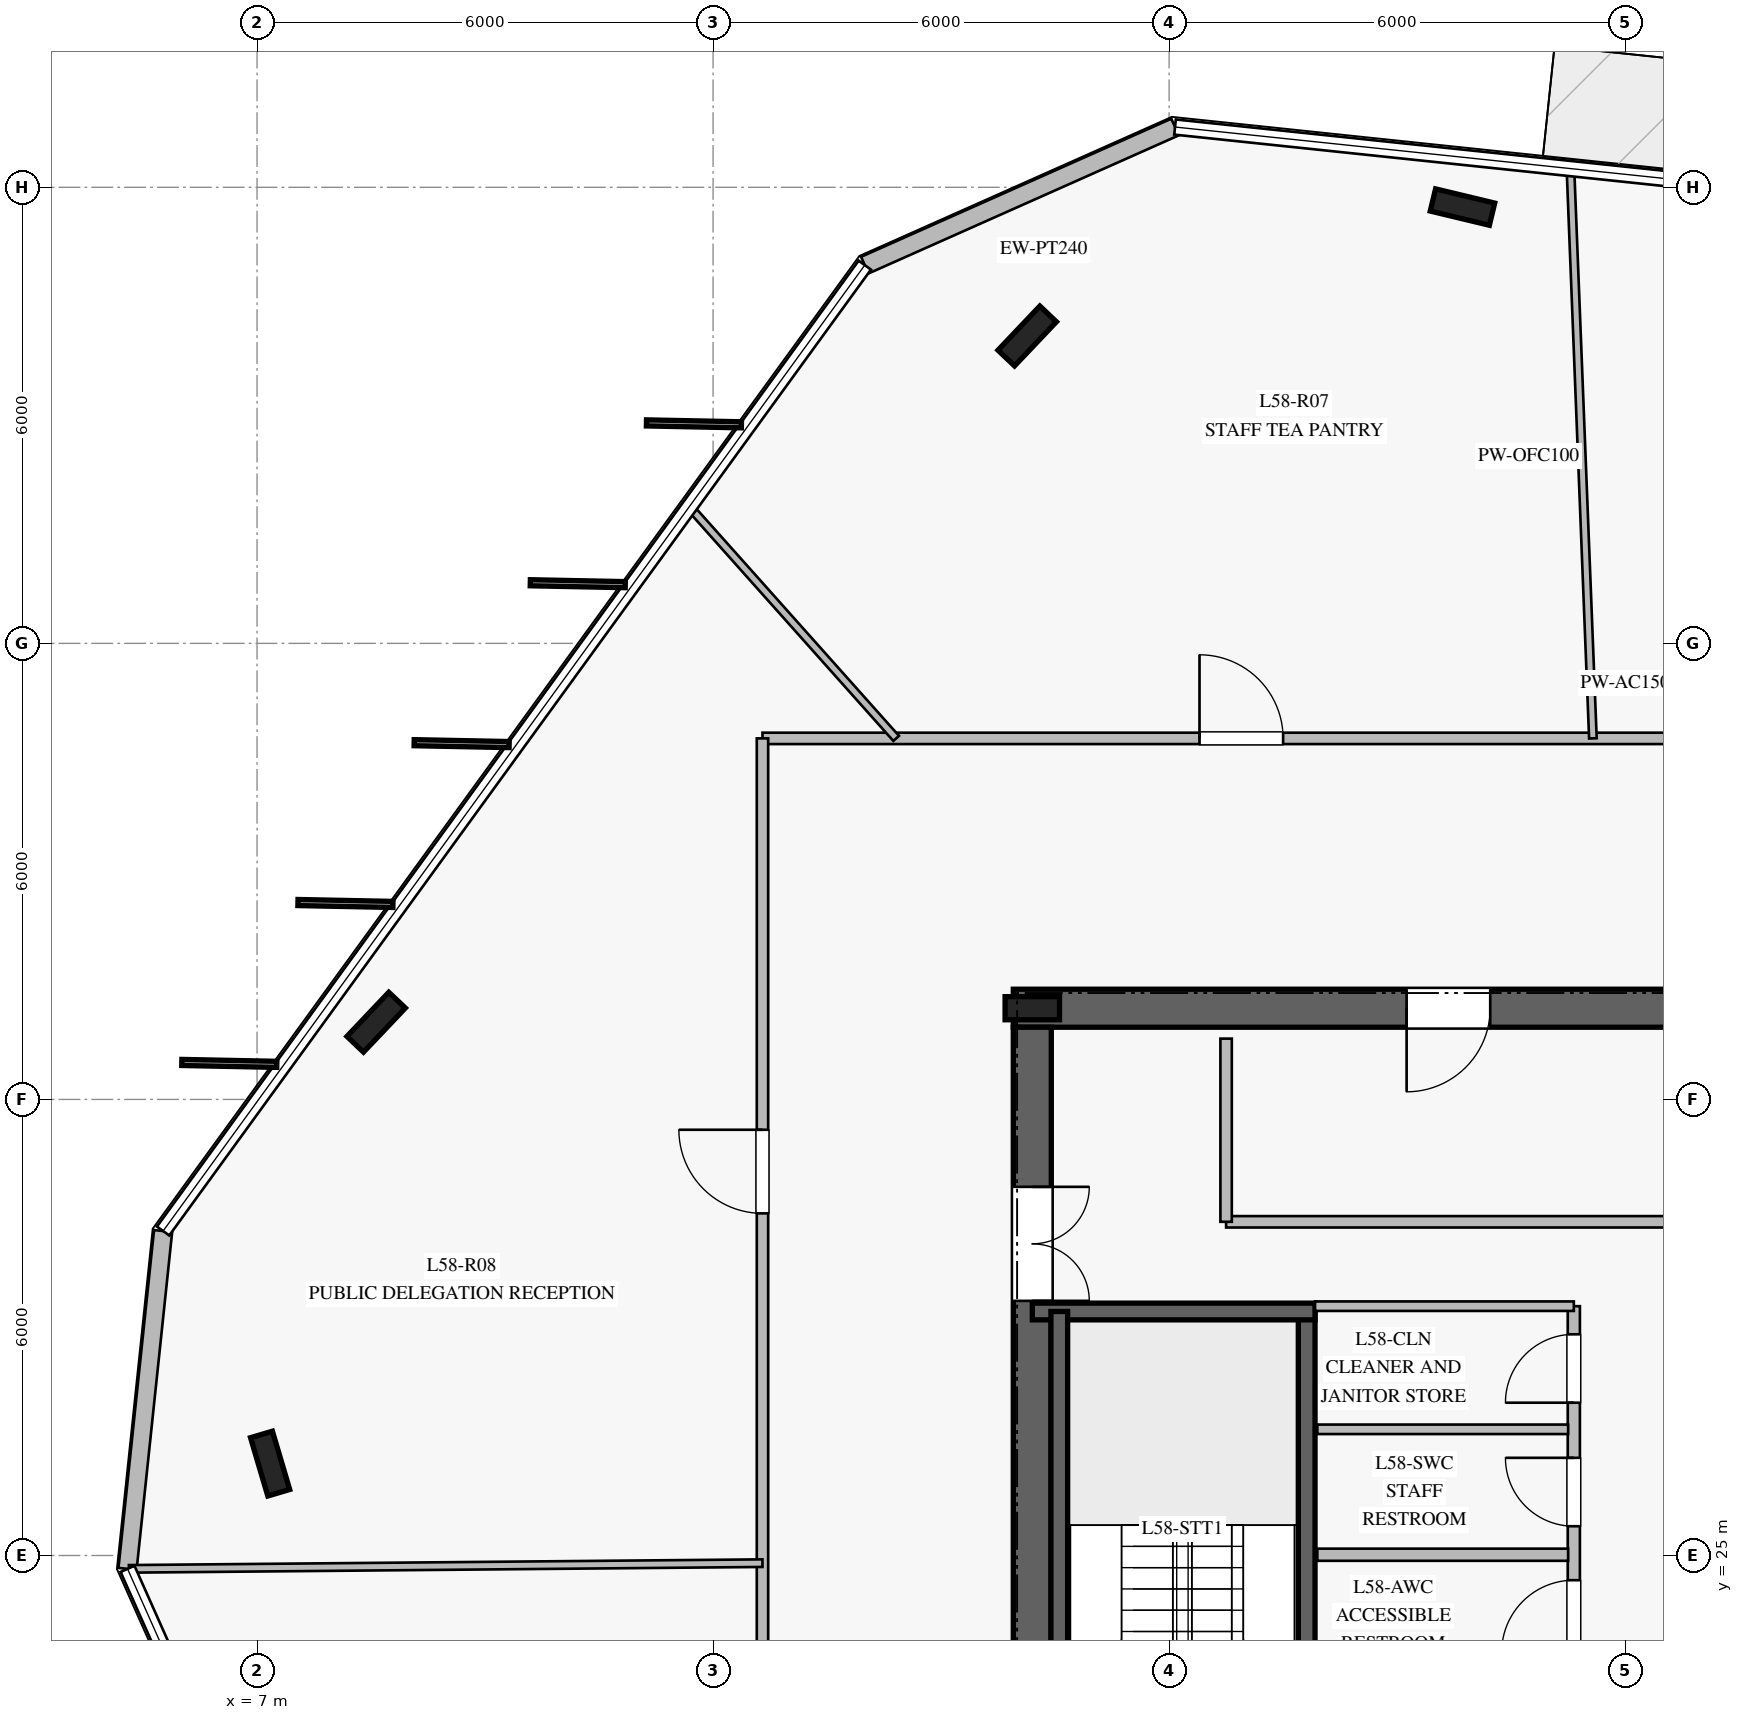
"""IFC4 building model, lengths in metres.
Left out: names, types, materials, properties, quantities, classifications, styles, units other than length and angle.
Written with IfcOpenShell. Run it as: python <this file> out.ifc"""

import sys

from ifc_helpers import new_model, si_unit, direction, frame, frame_2d, origin, origin_2d, place, context, subcontext, project, spatial, rectangle, i_section, extrude, element, fill, save


model = new_model("IFC4")
c1 = context("Model", 3, precision=1e-05, world=origin(), true_north=direction((0.0, 1.0)))
c2 = subcontext(c1, "Body", "Model", "MODEL_VIEW")
j1 = project(units=[si_unit("LENGTHUNIT", "METRE"), si_unit("PLANEANGLEUNIT", "RADIAN")], contexts=[c1])
p1 = place(None, origin())
s1 = spatial("IfcSite", under=j1, at=p1, CompositionType="ELEMENT")
p2 = place(p1, origin())
s2 = spatial("IfcBuilding", under=s1, at=p2, CompositionType="ELEMENT")
p3 = place(p2, frame((0.0, 0.0, 240.8)))
s3 = spatial("IfcBuildingStorey", under=s2, at=p3, CompositionType="ELEMENT", Elevation=240.8)
p4 = place(p3, frame((33.05, 32.2, 0.0), z_axis=(0.0, 0.0, 1.0), x_axis=(-1.0, 0.0, 0.0)))
e1 = element("IfcWall", 1, at=p4, inside=s3, PredefinedType="SHEAR", context=c2, shape_type="SweptSolid", body=[
    extrude(rectangle(XDim=16.1, YDim=0.5, at=frame_2d((8.05, 0.0))), origin(), (0.0, 0.0, 1.0), 3.7),
])
p5 = place(p4, frame((5.0, 0.0, 0.0)))
e2 = element("IfcOpeningElement", 2, at=p5, cuts=e1, PredefinedType="OPENING", context=c2, shape_type="SweptSolid", body=[
    extrude(rectangle(XDim=1.2, YDim=2.25, at=frame_2d((0.6, 1.125))), frame((0.0, 0.26, 0.0), z_axis=(0.0, -1.0, 0.0), x_axis=(1.0, 0.0, 0.0)), (0.0, 0.0, 1.0), 0.52),
])
p6 = place(p4, frame((9.825, 0.0, 0.0)))
e3 = element("IfcOpeningElement", 3, at=p6, cuts=e1, PredefinedType="OPENING", context=c2, shape_type="SweptSolid", body=[
    extrude(rectangle(XDim=1.1, YDim=2.2, at=frame_2d((0.55, 1.1))), frame((0.0, 0.26, 0.0), z_axis=(0.0, -1.0, 0.0), x_axis=(1.0, 0.0, 0.0)), (0.0, 0.0, 1.0), 0.52),
])
p7 = place(p3, frame((17.2, 31.95, 0.0), z_axis=(0.0, 0.0, 1.0), x_axis=(0.0, -1.0, 0.0)))
e4 = element("IfcWall", 4, at=p7, inside=s3, PredefinedType="SHEAR", context=c2, shape_type="SweptSolid", body=[
    extrude(rectangle(XDim=13.9, YDim=0.5, at=frame_2d((6.95, 0.0))), origin(), (0.0, 0.0, 1.0), 3.7),
])
p8 = place(p7, frame((2.1, 0.0, 0.0)))
e5 = element("IfcOpeningElement", 5, at=p8, cuts=e4, PredefinedType="OPENING", context=c2, shape_type="SweptSolid", body=[
    extrude(rectangle(XDim=1.5, YDim=2.2, at=frame_2d((0.75, 1.1))), frame((0.0, 0.26, 0.0), z_axis=(0.0, -1.0, 0.0), x_axis=(1.0, 0.0, 0.0)), (0.0, 0.0, 1.0), 0.52),
])
p9 = place(p3, frame((17.2, 32.2, 0.0), z_axis=(0.0, 0.0, 1.0), x_axis=(1.0, 0.0, 0.0)))
e6 = element("IfcColumn", 6, at=p9, inside=s3, PredefinedType="COLUMN", context=c2, shape_type="SweptSolid", body=[
    extrude(i_section(OverallWidth=0.304, OverallDepth=0.716, WebThickness=0.021, FlangeThickness=0.04, at=origin_2d()), origin(), (0.0, 0.0, 1.0), 4.0),
])
p10 = place(p3, frame((20.81, 20.99, 0.0), z_axis=(0.0, 0.0, 1.0), x_axis=(0.0, 1.0, 0.0)))
e7 = element("IfcWall", 7, at=p10, inside=s3, PredefinedType="SOLIDWALL", context=c2, shape_type="SweptSolid", body=[
    extrude(rectangle(XDim=7.22, YDim=0.22, at=frame_2d((3.61, 0.0))), origin(), (0.0, 0.0, 1.0), 3.7),
])
p11 = place(p10, frame((0.18, 0.0, 0.0)))
e8 = element("IfcOpeningElement", 8, at=p11, cuts=e7, PredefinedType="OPENING", context=c2, shape_type="SweptSolid", body=[
    extrude(rectangle(XDim=1.15, YDim=2.2, at=frame_2d((0.575, 1.1))), frame((0.0, 0.12, 0.0), z_axis=(0.0, -1.0, 0.0), x_axis=(1.0, 0.0, 0.0)), (0.0, 0.0, 1.0), 0.24),
])
p12 = place(p3, frame((17.2, 28.21, 0.0), z_axis=(0.0, 0.0, 1.0), x_axis=(1.0, 0.0, 0.0)))
e9 = element("IfcWall", 9, at=p12, inside=s3, PredefinedType="SOLIDWALL", context=c2, shape_type="SweptSolid", body=[
    extrude(rectangle(XDim=3.72, YDim=0.22, at=frame_2d((1.86, 0.0))), origin(), (0.0, 0.0, 1.0), 3.7),
])
p13 = place(p3, frame((17.555, 28.21, 0.0), z_axis=(0.0, 0.0, 1.0), x_axis=(0.0, -1.0, 0.0)))
e10 = element("IfcWall", 10, at=p13, inside=s3, PredefinedType="SOLIDWALL", context=c2, shape_type="SweptSolid", body=[
    extrude(rectangle(XDim=7.22, YDim=0.22, at=frame_2d((3.61, 0.0))), origin(), (0.0, 0.0, 1.0), 3.7),
])
for number, where, z_axis, x_axis in (
    (11, (22.86, 42.74, 0.0), (0.0, 0.0, 1.0), (-0.972, 0.233, 0.0)),
    (12, (17.133, 41.044, 0.0), (0.0, 0.0, 1.0), (0.688, 0.725, 0.0)),
    (13, (8.567, 32.016, 0.0), (0.0, 0.0, 1.0), (0.688, 0.725, 0.0)),
    (14, (7.172, 26.209, 0.0), (0.0, 0.0, 1.0), (-0.284, 0.959, 0.0)),
):
    element("IfcColumn", number, at=place(p3, frame(where, z_axis=z_axis, x_axis=x_axis)), inside=s3, PredefinedType="COLUMN", context=c2, shape_type="SweptSolid", body=[
        extrude(i_section(OverallWidth=0.3, OverallDepth=0.8, WebThickness=0.018, FlangeThickness=0.033, at=origin_2d()), origin(), (0.0, 0.0, 1.0), 4.0),
    ])
p14 = place(p3, frame((19.078, 43.793, 0.0), z_axis=(0.0, 0.0, 1.0), x_axis=(-0.913581562374, -0.406655540833, 0.0)))
e15 = element("IfcWall", 15, at=p14, inside=s3, PredefinedType="STANDARD", context=c2, shape_type="SweptSolid", body=[
    extrude(rectangle(XDim=4.468, YDim=0.24, at=frame_2d((2.234, 0.0))), origin(), (0.0, 0.0, 1.0), 3.7),
])
p15 = place(p3, frame((5.764, 29.269, 0.0), z_axis=(0.0, 0.0, 1.0), x_axis=(-0.104710374516, -0.994502758904, 0.0)))
e16 = element("IfcWall", 16, at=p15, inside=s3, PredefinedType="STANDARD", context=c2, shape_type="SweptSolid", body=[
    extrude(rectangle(XDim=4.47, YDim=0.24, at=frame_2d((2.235, 0.0))), origin(), (0.0, 0.0, 1.0), 3.7),
])
p16 = place(p3, frame((24.325, 23.35, 0.0), z_axis=(0.0, 0.0, 1.0), x_axis=(0.0, 1.0, 0.0)))
e17 = element("IfcWall", 17, at=p16, inside=s3, PredefinedType="PLUMBINGWALL", context=c2, shape_type="SweptSolid", body=[
    extrude(rectangle(XDim=4.93, YDim=0.16, at=frame_2d((2.465, 0.0))), origin(), (0.0, 0.0, 1.0), 3.7),
])
p17 = place(p16, frame((0.375, 0.0, 0.0)))
e18 = element("IfcOpeningElement", 18, at=p17, cuts=e17, PredefinedType="OPENING", context=c2, shape_type="SweptSolid", body=[
    extrude(rectangle(XDim=0.95, YDim=2.1, at=frame_2d((0.475, 1.05))), frame((0.0, 0.09, 0.0), z_axis=(0.0, -1.0, 0.0), x_axis=(1.0, 0.0, 0.0)), (0.0, 0.0, 1.0), 0.18),
])
p18 = place(p16, frame((2.035, 0.0, 0.0)))
e19 = element("IfcOpeningElement", 19, at=p18, cuts=e17, PredefinedType="OPENING", context=c2, shape_type="SweptSolid", body=[
    extrude(rectangle(XDim=0.9, YDim=2.1, at=frame_2d((0.45, 1.05))), frame((0.0, 0.09, 0.0), z_axis=(0.0, -1.0, 0.0), x_axis=(1.0, 0.0, 0.0)), (0.0, 0.0, 1.0), 0.18),
])
p19 = place(p16, frame((3.66, 0.0, 0.0)))
e20 = element("IfcOpeningElement", 20, at=p19, cuts=e17, PredefinedType="OPENING", context=c2, shape_type="SweptSolid", body=[
    extrude(rectangle(XDim=0.9, YDim=2.1, at=frame_2d((0.45, 1.05))), frame((0.0, 0.09, 0.0), z_axis=(0.0, -1.0, 0.0), x_axis=(1.0, 0.0, 0.0)), (0.0, 0.0, 1.0), 0.18),
])
p20 = place(p3, frame((20.92, 28.28, 0.0), z_axis=(0.0, 0.0, 1.0), x_axis=(1.0, 0.0, 0.0)))
e21 = element("IfcWall", 21, at=p20, inside=s3, PredefinedType="PARTITIONING", context=c2, shape_type="SweptSolid", body=[
    extrude(rectangle(XDim=3.405, YDim=0.125, at=frame_2d((1.703, 0.0))), origin(), (0.0, 0.0, 1.0), 3.7),
])
p21 = place(p3, frame((20.95, 25.01, 0.0), z_axis=(0.0, 0.0, 1.0), x_axis=(1.0, 0.0, 0.0)))
e22 = element("IfcWall", 22, at=p21, inside=s3, PredefinedType="PLUMBINGWALL", context=c2, shape_type="SweptSolid", body=[
    extrude(rectangle(XDim=3.3, YDim=0.16, at=frame_2d((1.65, 0.0))), origin(), (0.0, 0.0, 1.0), 3.7),
])
p22 = place(p3, frame((20.95, 26.66, 0.0), z_axis=(0.0, 0.0, 1.0), x_axis=(1.0, 0.0, 0.0)))
e23 = element("IfcWall", 23, at=p22, inside=s3, PredefinedType="PARTITIONING", context=c2, shape_type="SweptSolid", body=[
    extrude(rectangle(XDim=3.3, YDim=0.125, at=frame_2d((1.65, 0.0))), origin(), (0.0, 0.0, 1.0), 3.7),
])
p23 = place(p3, frame((19.75, 29.39, 0.0), z_axis=(0.0, 0.0, 1.0), x_axis=(1.0, 0.0, 0.0)))
e24 = element("IfcWall", 24, at=p23, inside=s3, PredefinedType="PARTITIONING", context=c2, shape_type="SweptSolid", body=[
    extrude(rectangle(XDim=5.9, YDim=0.15, at=frame_2d((2.95, 0.0))), origin(), (0.0, 0.0, 1.0), 3.7),
])
p24 = place(p3, frame((19.75, 29.39, 0.0), z_axis=(0.0, 0.0, 1.0), x_axis=(0.0, 1.0, 0.0)))
e25 = element("IfcWall", 25, at=p24, inside=s3, PredefinedType="PARTITIONING", context=c2, shape_type="SweptSolid", body=[
    extrude(rectangle(XDim=2.41, YDim=0.15, at=frame_2d((1.205, 0.0))), origin(), (0.0, 0.0, 1.0), 3.7),
])
p25 = place(p3, frame((13.65, 35.75, 0.0), z_axis=(0.0, 0.0, 1.0), x_axis=(1.0, 0.0, 0.0)))
e26 = element("IfcWall", 26, at=p25, inside=s3, PredefinedType="PARTITIONING", context=c2, shape_type="SweptSolid", body=[
    extrude(rectangle(XDim=22.7, YDim=0.15, at=frame_2d((11.35, 0.0))), origin(), (0.0, 0.0, 1.0), 3.2),
])
p26 = place(p25, frame((16.078, 0.0, 0.0)))
e27 = element("IfcOpeningElement", 27, at=p26, cuts=e26, PredefinedType="OPENING", context=c2, shape_type="SweptSolid", body=[
    extrude(rectangle(XDim=1.1, YDim=2.2, at=frame_2d((0.55, 1.1))), frame((0.0, 0.085, 0.0), z_axis=(0.0, -1.0, 0.0), x_axis=(1.0, 0.0, 0.0)), (0.0, 0.0, 1.0), 0.17),
])
p27 = place(p25, frame((5.75, 0.0, 0.0)))
e28 = element("IfcOpeningElement", 28, at=p27, cuts=e26, PredefinedType="OPENING", context=c2, shape_type="SweptSolid", body=[
    extrude(rectangle(XDim=1.1, YDim=2.2, at=frame_2d((0.55, 1.1))), frame((0.0, 0.085, 0.0), z_axis=(0.0, -1.0, 0.0), x_axis=(1.0, 0.0, 0.0)), (0.0, 0.0, 1.0), 0.17),
])
p28 = place(p3, frame((13.65, 14.25, 0.0), z_axis=(0.0, 0.0, 1.0), x_axis=(0.0, 1.0, 0.0)))
e29 = element("IfcWall", 29, at=p28, inside=s3, PredefinedType="PARTITIONING", context=c2, shape_type="SweptSolid", body=[
    extrude(rectangle(XDim=21.5, YDim=0.15, at=frame_2d((10.75, 0.0))), origin(), (0.0, 0.0, 1.0), 3.2),
])
p29 = place(p28, frame((4.958, 0.0, 0.0)))
e30 = element("IfcOpeningElement", 30, at=p29, cuts=e29, PredefinedType="OPENING", context=c2, shape_type="SweptSolid", body=[
    extrude(rectangle(XDim=1.1, YDim=2.2, at=frame_2d((0.55, 1.1))), frame((0.0, 0.085, 0.0), z_axis=(0.0, -1.0, 0.0), x_axis=(1.0, 0.0, 0.0)), (0.0, 0.0, 1.0), 0.17),
])
p30 = place(p28, frame((15.251, 0.0, 0.0)))
e31 = element("IfcOpeningElement", 31, at=p30, cuts=e29, PredefinedType="OPENING", context=c2, shape_type="SweptSolid", body=[
    extrude(rectangle(XDim=1.1, YDim=2.2, at=frame_2d((0.55, 1.1))), frame((0.0, 0.085, 0.0), z_axis=(0.0, -1.0, 0.0), x_axis=(1.0, 0.0, 0.0)), (0.0, 0.0, 1.0), 0.17),
])
p31 = place(p3, frame((24.576, 35.75, 0.0), z_axis=(0.0, 0.0, 1.0), x_axis=(-0.03939754968, 0.999223615153, 0.0)))
e32 = element("IfcWall", 32, at=p31, inside=s3, PredefinedType="MOVABLE", context=c2, shape_type="SweptSolid", body=[
    extrude(rectangle(XDim=7.486, YDim=0.1, at=frame_2d((3.743, 0.0))), origin(), (0.0, 0.0, 1.0), 3.1),
])
p32 = place(p3, frame((15.409, 35.75, 0.0), z_axis=(0.0, 0.0, 1.0), x_axis=(-0.665777348023, 0.746150469316, 0.0)))
e33 = element("IfcWall", 33, at=p32, inside=s3, PredefinedType="MOVABLE", context=c2, shape_type="SweptSolid", body=[
    extrude(rectangle(XDim=4.07, YDim=0.1, at=frame_2d((2.035, 0.0))), origin(), (0.0, 0.0, 1.0), 3.1),
])
p33 = place(p3, frame((13.65, 24.899, 0.0), z_axis=(0.0, 0.0, 1.0), x_axis=(-0.999959580436, -0.008990967408, 0.0)))
e34 = element("IfcWall", 34, at=p33, inside=s3, PredefinedType="MOVABLE", context=c2, shape_type="SweptSolid", body=[
    extrude(rectangle(XDim=8.336, YDim=0.1, at=frame_2d((4.168, 0.0))), origin(), (0.0, 0.0, 1.0), 3.1),
])
p34 = place(p8, origin())
e35 = element("IfcDoor", 35, at=p34, inside=s3, OperationType="DOUBLE_DOOR_SINGLE_SWING", PredefinedType="DOOR", context=c2, shape_type="SweptSolid", body=[
    extrude(rectangle(XDim=1.5, YDim=2.2, at=frame_2d((0.75, 1.1))), frame((0.0, 0.025, 0.0), z_axis=(0.0, -1.0, 0.0), x_axis=(1.0, 0.0, 0.0)), (0.0, 0.0, 1.0), 0.05),
])
fill(e5, e35)
p35 = place(p17, origin())
e36 = element("IfcDoor", 36, at=p35, inside=s3, OperationType="SINGLE_SWING_LEFT", PredefinedType="DOOR", context=c2, shape_type="SweptSolid", body=[
    extrude(rectangle(XDim=0.95, YDim=2.1, at=frame_2d((0.475, 1.05))), frame((0.0, 0.025, 0.0), z_axis=(0.0, -1.0, 0.0), x_axis=(1.0, 0.0, 0.0)), (0.0, 0.0, 1.0), 0.05),
])
fill(e18, e36)
p36 = place(p18, origin())
e37 = element("IfcDoor", 37, at=p36, inside=s3, OperationType="SINGLE_SWING_RIGHT", PredefinedType="DOOR", context=c2, shape_type="SweptSolid", body=[
    extrude(rectangle(XDim=0.9, YDim=2.1, at=frame_2d((0.45, 1.05))), frame((0.0, 0.025, 0.0), z_axis=(0.0, -1.0, 0.0), x_axis=(1.0, 0.0, 0.0)), (0.0, 0.0, 1.0), 0.05),
])
fill(e19, e37)
p37 = place(p19, origin())
e38 = element("IfcDoor", 38, at=p37, inside=s3, OperationType="SINGLE_SWING_LEFT", PredefinedType="DOOR", context=c2, shape_type="SweptSolid", body=[
    extrude(rectangle(XDim=0.9, YDim=2.1, at=frame_2d((0.45, 1.05))), frame((0.0, 0.025, 0.0), z_axis=(0.0, -1.0, 0.0), x_axis=(1.0, 0.0, 0.0)), (0.0, 0.0, 1.0), 0.05),
])
fill(e20, e38)
p38 = place(p6, origin())
e39 = element("IfcDoor", 39, at=p38, inside=s3, OperationType="SINGLE_SWING_RIGHT", PredefinedType="DOOR", context=c2, shape_type="SweptSolid", body=[
    extrude(rectangle(XDim=1.1, YDim=2.2, at=frame_2d((0.55, 1.1))), frame((0.0, 0.025, 0.0), z_axis=(0.0, -1.0, 0.0), x_axis=(1.0, 0.0, 0.0)), (0.0, 0.0, 1.0), 0.05),
])
fill(e3, e39)
p39 = place(p27, origin())
e40 = element("IfcDoor", 40, at=p39, inside=s3, OperationType="SINGLE_SWING_LEFT", PredefinedType="DOOR", context=c2, shape_type="SweptSolid", body=[
    extrude(rectangle(XDim=1.1, YDim=2.2, at=frame_2d((0.55, 1.1))), frame((0.0, 0.025, 0.0), z_axis=(0.0, -1.0, 0.0), x_axis=(1.0, 0.0, 0.0)), (0.0, 0.0, 1.0), 0.05),
])
fill(e28, e40)
p40 = place(p30, origin())
e41 = element("IfcDoor", 41, at=p40, inside=s3, OperationType="SINGLE_SWING_RIGHT", PredefinedType="DOOR", context=c2, shape_type="SweptSolid", body=[
    extrude(rectangle(XDim=1.1, YDim=2.2, at=frame_2d((0.55, 1.1))), frame((0.0, 0.025, 0.0), z_axis=(0.0, -1.0, 0.0), x_axis=(1.0, 0.0, 0.0)), (0.0, 0.0, 1.0), 0.05),
])
fill(e31, e41)
save(model, sys.argv[1])
